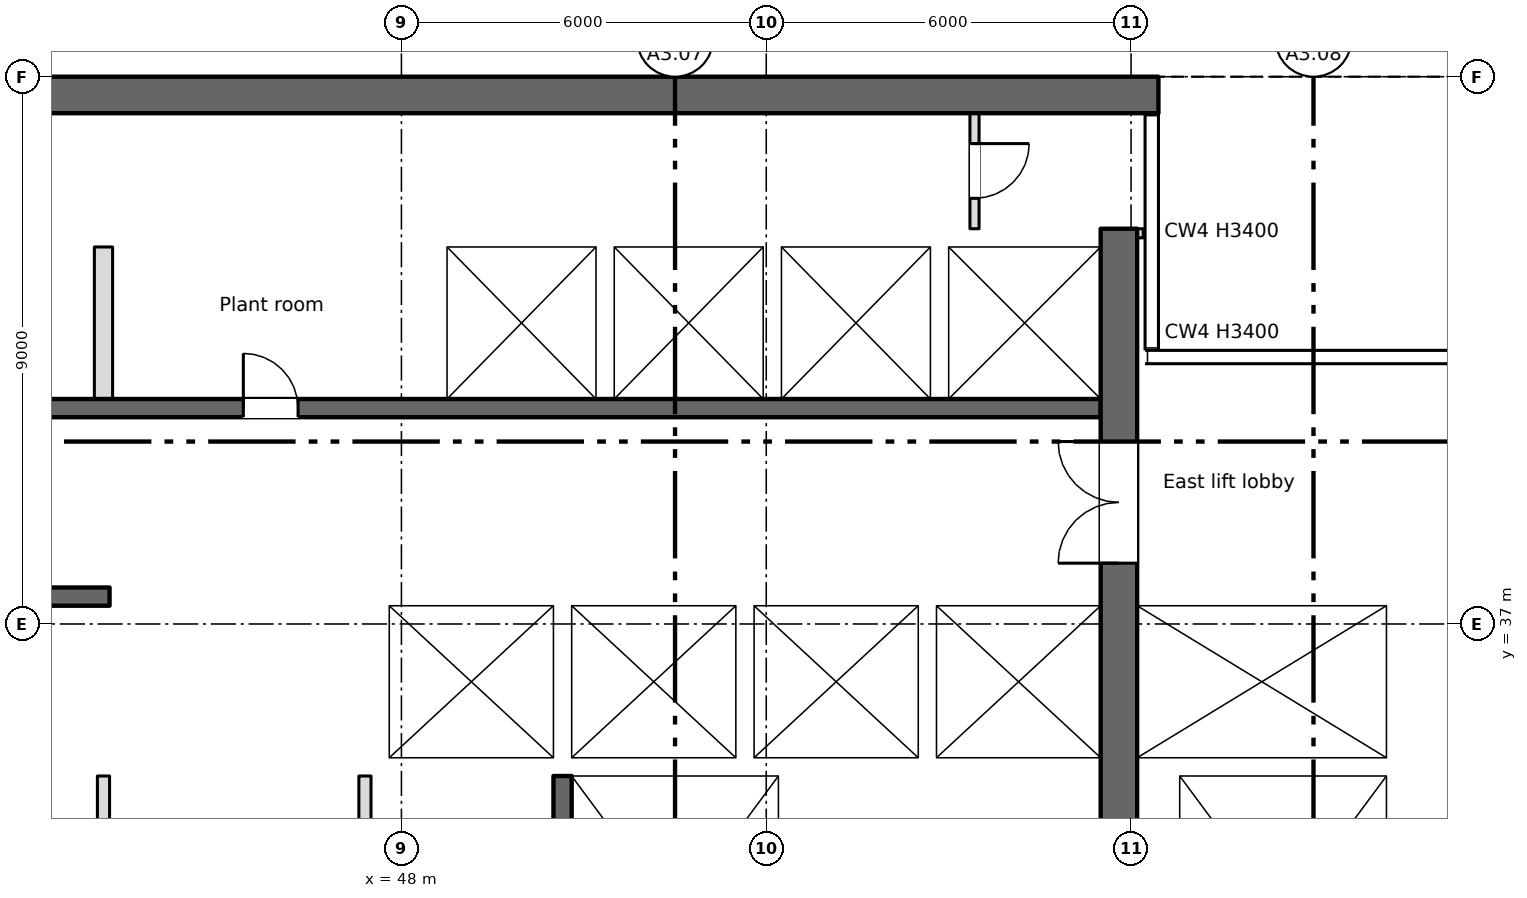
"""IFC4 building model, lengths in metres.
Left out: names, types, materials, properties, quantities, classifications, styles, units other than length and angle.
Written with IfcOpenShell. Run it as: python <this file> out.ifc"""

import sys

from ifc_helpers import new_model, si_unit, direction, frame, frame_2d, origin, place, context, subcontext, project, spatial, rectangle, extrude, element, fill, save


model = new_model("IFC4")
c1 = context("Model", 3, precision=1e-05, world=origin(), true_north=direction((0.0, 1.0)))
c2 = subcontext(c1, "Body", "Model", "MODEL_VIEW")
j1 = project(units=[si_unit("LENGTHUNIT", "METRE"), si_unit("PLANEANGLEUNIT", "RADIAN")], contexts=[c1])
p1 = place(None, origin())
s1 = spatial("IfcSite", under=j1, at=p1, CompositionType="ELEMENT")
p2 = place(p1, origin())
s2 = spatial("IfcBuilding", under=s1, at=p2, CompositionType="ELEMENT")
p3 = place(p2, frame((0.0, 0.0, 254.55)))
s3 = spatial("IfcBuildingStorey", under=s2, at=p3, CompositionType="ELEMENT", Elevation=254.55)
p4 = place(p3, frame((11.55, 45.7, 0.0), z_axis=(0.0, 0.0, 1.0), x_axis=(1.0, 0.0, 0.0)))
e1 = element("IfcWall", 1, at=p4, inside=s3, PredefinedType="SHEAR", context=c2, shape_type="SweptSolid", body=[
    extrude(rectangle(XDim=48.9, YDim=0.6, at=frame_2d((24.45, 0.0))), origin(), (0.0, 0.0, 1.0), 3.4),
])
p5 = place(p3, frame((64.35, 34.8, 0.0), z_axis=(0.0, 0.0, 1.0), x_axis=(0.0, 1.0, 0.0)))
e2 = element("IfcWall", 2, at=p5, inside=s3, PredefinedType="SHEAR", context=c2, shape_type="SweptSolid", body=[
    extrude(rectangle(XDim=6.45, YDim=0.3, at=frame_2d((3.225, 0.0))), origin(), (0.0, 0.0, 1.0), 3.4),
])
p6 = place(p3, frame((59.8, 28.4, 0.0), z_axis=(0.0, 0.0, 1.0), x_axis=(0.0, 1.0, 0.0)))
e3 = element("IfcWall", 3, at=p6, inside=s3, PredefinedType="SHEAR", context=c2, shape_type="SweptSolid", body=[
    extrude(rectangle(XDim=15.1, YDim=0.6, at=frame_2d((7.55, 0.0))), origin(), (0.0, 0.0, 1.0), 3.4),
])
p7 = place(p6, frame((9.6, 0.0, 0.0)))
e4 = element("IfcOpeningElement", 4, at=p7, cuts=e3, PredefinedType="OPENING", context=c2, shape_type="SweptSolid", body=[
    extrude(rectangle(XDim=2.0, YDim=2.1, at=frame_2d((1.0, 1.05))), frame((0.0, 0.31, 0.0), z_axis=(0.0, -1.0, 0.0), x_axis=(1.0, 0.0, 0.0)), (0.0, 0.0, 1.0), 0.62),
])
p8 = place(p3, frame((50.65, 34.5, 0.0), z_axis=(0.0, 0.0, 1.0), x_axis=(0.0, -1.0, 0.0)))
e5 = element("IfcWall", 5, at=p8, inside=s3, PredefinedType="SHEAR", context=c2, shape_type="SweptSolid", body=[
    extrude(rectangle(XDim=6.1, YDim=0.3, at=frame_2d((3.05, 0.0))), origin(), (0.0, 0.0, 1.0), 3.4),
])
p9 = place(p8, frame((4.95, 0.0, 0.0)))
e6 = element("IfcOpeningElement", 6, at=p9, cuts=e5, PredefinedType="OPENING", context=c2, shape_type="SweptSolid", body=[
    extrude(rectangle(XDim=1.1, YDim=2.1, at=frame_2d((0.55, 1.05))), frame((0.0, 0.16, 0.0), z_axis=(0.0, -1.0, 0.0), x_axis=(1.0, 0.0, 0.0)), (0.0, 0.0, 1.0), 0.32),
])
p10 = place(p3, frame((54.35, 28.4, 0.0), z_axis=(0.0, 0.0, 1.0), x_axis=(0.0, 1.0, 0.0)))
e7 = element("IfcWall", 7, at=p10, inside=s3, PredefinedType="SHEAR", context=c2, shape_type="SweptSolid", body=[
    extrude(rectangle(XDim=6.1, YDim=0.3, at=frame_2d((3.05, 0.0))), origin(), (0.0, 0.0, 1.0), 3.4),
])
p11 = place(p3, frame((60.45, 28.4, 0.0), z_axis=(0.0, 0.0, 1.0), x_axis=(0.0, 1.0, 0.0)))
e8 = element("IfcWall", 8, at=p11, inside=s3, PredefinedType="SHEAR", context=c2, shape_type="SweptSolid", body=[
    extrude(rectangle(XDim=6.1, YDim=0.7, at=frame_2d((3.05, 0.0))), origin(), (0.0, 0.0, 1.0), 3.4),
])
p12 = place(p3, frame((64.35, 28.4, 0.0), z_axis=(0.0, 0.0, 1.0), x_axis=(0.0, 1.0, 0.0)))
e9 = element("IfcWall", 9, at=p12, inside=s3, PredefinedType="SHEAR", context=c2, shape_type="SweptSolid", body=[
    extrude(rectangle(XDim=6.1, YDim=0.3, at=frame_2d((3.05, 0.0))), origin(), (0.0, 0.0, 1.0), 3.4),
])
p13 = place(p3, frame((34.8, 34.65, 0.0), z_axis=(0.0, 0.0, 1.0), x_axis=(1.0, 0.0, 0.0)))
e10 = element("IfcWall", 10, at=p13, inside=s3, PredefinedType="SHEAR", context=c2, shape_type="SweptSolid", body=[
    extrude(rectangle(XDim=8.4, YDim=0.3, at=frame_2d((4.2, 0.0))), origin(), (0.0, 0.0, 1.0), 3.4),
])
p14 = place(p3, frame((47.3, 34.65, 0.0), z_axis=(0.0, 0.0, 1.0), x_axis=(1.0, 0.0, 0.0)))
e11 = element("IfcWall", 11, at=p14, inside=s3, PredefinedType="SHEAR", context=c2, shape_type="SweptSolid", body=[
    extrude(rectangle(XDim=12.2, YDim=0.3, at=frame_2d((6.1, 0.0))), origin(), (0.0, 0.0, 1.0), 3.4),
])
p15 = place(p14, frame((1.3, 0.0, 0.0)))
e12 = element("IfcOpeningElement", 12, at=p15, cuts=e11, PredefinedType="OPENING", context=c2, shape_type="SweptSolid", body=[
    extrude(rectangle(XDim=1.1, YDim=2.1, at=frame_2d((0.55, 1.05))), frame((0.0, 0.16, 0.0), z_axis=(0.0, -1.0, 0.0), x_axis=(1.0, 0.0, 0.0)), (0.0, 0.0, 1.0), 0.32),
])
p16 = place(p3, frame((60.1, 34.65, 0.0), z_axis=(0.0, 0.0, 1.0), x_axis=(1.0, 0.0, 0.0)))
e13 = element("IfcWall", 13, at=p16, inside=s3, PredefinedType="SHEAR", context=c2, shape_type="SweptSolid", body=[
    extrude(rectangle(XDim=4.4, YDim=0.3, at=frame_2d((2.2, 0.0))), origin(), (0.0, 0.0, 1.0), 3.4),
])
p17 = place(p3, frame((43.2, 37.45, 0.0), z_axis=(0.0, 0.0, 1.0), x_axis=(-1.0, 0.0, 0.0)))
e14 = element("IfcWall", 14, at=p17, inside=s3, PredefinedType="SHEAR", context=c2, shape_type="SweptSolid", body=[
    extrude(rectangle(XDim=8.4, YDim=0.3, at=frame_2d((4.2, 0.0))), origin(), (0.0, 0.0, 1.0), 3.4),
])
p18 = place(p17, frame((3.75, 0.0, 0.0)))
e15 = element("IfcOpeningElement", 15, at=p18, cuts=e14, PredefinedType="OPENING", context=c2, shape_type="SweptSolid", body=[
    extrude(rectangle(XDim=0.9, YDim=2.1, at=frame_2d((0.45, 1.05))), frame((0.0, 0.16, 0.0), z_axis=(0.0, -1.0, 0.0), x_axis=(1.0, 0.0, 0.0)), (0.0, 0.0, 1.0), 0.32),
])
p19 = place(p3, frame((47.3, 37.45, 0.0), z_axis=(0.0, 0.0, 1.0), x_axis=(1.0, 0.0, 0.0)))
e16 = element("IfcWall", 16, at=p19, inside=s3, PredefinedType="SHEAR", context=c2, shape_type="SweptSolid", body=[
    extrude(rectangle(XDim=12.2, YDim=0.3, at=frame_2d((6.1, 0.0))), origin(), (0.0, 0.0, 1.0), 3.4),
])
p20 = place(p19, frame((4.3, 0.0, 0.0)))
e17 = element("IfcOpeningElement", 17, at=p20, cuts=e16, PredefinedType="OPENING", context=c2, shape_type="SweptSolid", body=[
    extrude(rectangle(XDim=1.1, YDim=2.1, at=frame_2d((0.55, 1.05))), frame((0.0, 0.16, 0.0), z_axis=(0.0, -1.0, 0.0), x_axis=(1.0, 0.0, 0.0)), (0.0, 0.0, 1.0), 0.32),
])
p21 = place(p19, frame((7.3, 0.0, 0.0)))
e18 = element("IfcOpeningElement", 18, at=p21, cuts=e16, PredefinedType="OPENING", context=c2, shape_type="SweptSolid", body=[
    extrude(rectangle(XDim=1.1, YDim=2.1, at=frame_2d((0.55, 1.05))), frame((0.0, 0.16, 0.0), z_axis=(0.0, -1.0, 0.0), x_axis=(1.0, 0.0, 0.0)), (0.0, 0.0, 1.0), 0.32),
])
p22 = place(p19, frame((10.3, 0.0, 0.0)))
e19 = element("IfcOpeningElement", 19, at=p22, cuts=e16, PredefinedType="OPENING", context=c2, shape_type="SweptSolid", body=[
    extrude(rectangle(XDim=1.1, YDim=2.1, at=frame_2d((0.55, 1.05))), frame((0.0, 0.16, 0.0), z_axis=(0.0, -1.0, 0.0), x_axis=(1.0, 0.0, 0.0)), (0.0, 0.0, 1.0), 0.32),
])
p23 = place(p3, frame((60.1, 37.45, 0.0), z_axis=(0.0, 0.0, 1.0), x_axis=(1.0, 0.0, 0.0)))
e20 = element("IfcWall", 20, at=p23, inside=s3, PredefinedType="SHEAR", context=c2, shape_type="SweptSolid", body=[
    extrude(rectangle(XDim=4.1, YDim=0.3, at=frame_2d((2.05, 0.0))), origin(), (0.0, 0.0, 1.0), 3.4),
])
p24 = place(p23, frame((1.5, 0.0, 0.0)))
e21 = element("IfcOpeningElement", 21, at=p24, cuts=e20, PredefinedType="OPENING", context=c2, shape_type="SweptSolid", body=[
    extrude(rectangle(XDim=1.1, YDim=2.1, at=frame_2d((0.55, 1.05))), frame((0.0, 0.16, 0.0), z_axis=(0.0, -1.0, 0.0), x_axis=(1.0, 0.0, 0.0)), (0.0, 0.0, 1.0), 0.32),
])
p25 = place(p3, frame((43.05, 34.8, 0.0), z_axis=(0.0, 0.0, 1.0), x_axis=(0.0, 1.0, 0.0)))
e22 = element("IfcWall", 22, at=p25, inside=s3, PredefinedType="SHEAR", context=c2, shape_type="SweptSolid", body=[
    extrude(rectangle(XDim=2.5, YDim=0.3, at=frame_2d((1.25, 0.0))), origin(), (0.0, 0.0, 1.0), 3.4),
])
p26 = place(p3, frame((47.55, 34.8, 0.0), z_axis=(0.0, 0.0, 1.0), x_axis=(0.0, 1.0, 0.0)))
e23 = element("IfcWall", 23, at=p26, inside=s3, PredefinedType="SHEAR", context=c2, shape_type="SweptSolid", body=[
    extrude(rectangle(XDim=2.5, YDim=0.5, at=frame_2d((1.25, 0.0))), origin(), (0.0, 0.0, 1.0), 3.4),
])
p27 = place(p3, frame((50.65, 34.8, 0.0), z_axis=(0.0, 0.0, 1.0), x_axis=(0.0, 1.0, 0.0)))
e24 = element("IfcWall", 24, at=p27, inside=s3, PredefinedType="SHEAR", context=c2, shape_type="SweptSolid", body=[
    extrude(rectangle(XDim=2.5, YDim=0.3, at=frame_2d((1.25, 0.0))), origin(), (0.0, 0.0, 1.0), 3.4),
])
p28 = place(p3, frame((18.5, 40.55, 0.0), z_axis=(0.0, 0.0, 1.0), x_axis=(1.0, 0.0, 0.0)))
e25 = element("IfcWall", 25, at=p28, inside=s3, PredefinedType="SHEAR", context=c2, shape_type="SweptSolid", body=[
    extrude(rectangle(XDim=41.0, YDim=0.3, at=frame_2d((20.5, 0.0))), origin(), (0.0, 0.0, 1.0), 3.4),
])
p29 = place(p28, frame((2.15, 0.0, 0.0)))
e26 = element("IfcOpeningElement", 26, at=p29, cuts=e25, PredefinedType="OPENING", context=c2, shape_type="SweptSolid", body=[
    extrude(rectangle(XDim=0.9, YDim=2.1, at=frame_2d((0.45, 1.05))), frame((0.0, 0.16, 0.0), z_axis=(0.0, -1.0, 0.0), x_axis=(1.0, 0.0, 0.0)), (0.0, 0.0, 1.0), 0.32),
])
p30 = place(p28, frame((15.9, 0.0, 0.0)))
e27 = element("IfcOpeningElement", 27, at=p30, cuts=e25, PredefinedType="OPENING", context=c2, shape_type="SweptSolid", body=[
    extrude(rectangle(XDim=0.9, YDim=2.1, at=frame_2d((0.45, 1.05))), frame((0.0, 0.16, 0.0), z_axis=(0.0, -1.0, 0.0), x_axis=(1.0, 0.0, 0.0)), (0.0, 0.0, 1.0), 0.32),
])
p31 = place(p28, frame((21.4, 0.0, 0.0)))
e28 = element("IfcOpeningElement", 28, at=p31, cuts=e25, PredefinedType="OPENING", context=c2, shape_type="SweptSolid", body=[
    extrude(rectangle(XDim=0.9, YDim=2.1, at=frame_2d((0.45, 1.05))), frame((0.0, 0.16, 0.0), z_axis=(0.0, -1.0, 0.0), x_axis=(1.0, 0.0, 0.0)), (0.0, 0.0, 1.0), 0.32),
])
p32 = place(p28, frame((26.9, 0.0, 0.0)))
e29 = element("IfcOpeningElement", 29, at=p32, cuts=e25, PredefinedType="OPENING", context=c2, shape_type="SweptSolid", body=[
    extrude(rectangle(XDim=0.9, YDim=2.1, at=frame_2d((0.45, 1.05))), frame((0.0, 0.16, 0.0), z_axis=(0.0, -1.0, 0.0), x_axis=(1.0, 0.0, 0.0)), (0.0, 0.0, 1.0), 0.32),
])
p33 = place(p28, frame((6.175, 0.0, 0.0)))
e30 = element("IfcOpeningElement", 30, at=p33, cuts=e25, PredefinedType="OPENING", context=c2, shape_type="SweptSolid", body=[
    extrude(rectangle(XDim=1.1, YDim=2.1, at=frame_2d((0.55, 1.05))), frame((0.0, 0.16, 0.0), z_axis=(0.0, -1.0, 0.0), x_axis=(1.0, 0.0, 0.0)), (0.0, 0.0, 1.0), 0.32),
])
p34 = place(p28, frame((8.925, 0.0, 0.0)))
e31 = element("IfcOpeningElement", 31, at=p34, cuts=e25, PredefinedType="OPENING", context=c2, shape_type="SweptSolid", body=[
    extrude(rectangle(XDim=1.1, YDim=2.1, at=frame_2d((0.55, 1.05))), frame((0.0, 0.16, 0.0), z_axis=(0.0, -1.0, 0.0), x_axis=(1.0, 0.0, 0.0)), (0.0, 0.0, 1.0), 0.32),
])
p35 = place(p28, frame((11.675, 0.0, 0.0)))
e32 = element("IfcOpeningElement", 32, at=p35, cuts=e25, PredefinedType="OPENING", context=c2, shape_type="SweptSolid", body=[
    extrude(rectangle(XDim=1.1, YDim=2.1, at=frame_2d((0.55, 1.05))), frame((0.0, 0.16, 0.0), z_axis=(0.0, -1.0, 0.0), x_axis=(1.0, 0.0, 0.0)), (0.0, 0.0, 1.0), 0.32),
])
p36 = place(p28, frame((30.925, 0.0, 0.0)))
e33 = element("IfcOpeningElement", 33, at=p36, cuts=e25, PredefinedType="OPENING", context=c2, shape_type="SweptSolid", body=[
    extrude(rectangle(XDim=1.1, YDim=2.1, at=frame_2d((0.55, 1.05))), frame((0.0, 0.16, 0.0), z_axis=(0.0, -1.0, 0.0), x_axis=(1.0, 0.0, 0.0)), (0.0, 0.0, 1.0), 0.32),
])
p37 = place(p28, frame((33.675, 0.0, 0.0)))
e34 = element("IfcOpeningElement", 34, at=p37, cuts=e25, PredefinedType="OPENING", context=c2, shape_type="SweptSolid", body=[
    extrude(rectangle(XDim=1.1, YDim=2.1, at=frame_2d((0.55, 1.05))), frame((0.0, 0.16, 0.0), z_axis=(0.0, -1.0, 0.0), x_axis=(1.0, 0.0, 0.0)), (0.0, 0.0, 1.0), 0.32),
])
p38 = place(p28, frame((36.375, 0.0, 0.0)))
e35 = element("IfcOpeningElement", 35, at=p38, cuts=e25, PredefinedType="OPENING", context=c2, shape_type="SweptSolid", body=[
    extrude(rectangle(XDim=1.2, YDim=2.1, at=frame_2d((0.6, 1.05))), frame((0.0, 0.16, 0.0), z_axis=(0.0, -1.0, 0.0), x_axis=(1.0, 0.0, 0.0)), (0.0, 0.0, 1.0), 0.32),
])
p39 = place(p28, frame((39.15, 0.0, 0.0)))
e36 = element("IfcOpeningElement", 36, at=p39, cuts=e25, PredefinedType="OPENING", context=c2, shape_type="SweptSolid", body=[
    extrude(rectangle(XDim=1.2, YDim=2.1, at=frame_2d((0.6, 1.05))), frame((0.0, 0.16, 0.0), z_axis=(0.0, -1.0, 0.0), x_axis=(1.0, 0.0, 0.0)), (0.0, 0.0, 1.0), 0.32),
])
p40 = place(p3, frame((18.5, 43.35, 0.0), z_axis=(0.0, 0.0, 1.0), x_axis=(1.0, 0.0, 0.0)))
e37 = element("IfcWall", 37, at=p40, inside=s3, PredefinedType="SHEAR", context=c2, shape_type="SweptSolid", body=[
    extrude(rectangle(XDim=41.0, YDim=0.3, at=frame_2d((20.5, 0.0))), origin(), (0.0, 0.0, 1.0), 3.4),
])
for number, where, z_axis, x_axis in (
    (38, (53.65, 34.8, 0.0), (0.0, 0.0, 1.0), (0.0, 1.0, 0.0)),
    (39, (56.65, 34.8, 0.0), (0.0, 0.0, 1.0), (0.0, 1.0, 0.0)),
    (40, (48.6, 40.7, 0.0), (0.0, 0.0, 1.0), (0.0, 1.0, 0.0)),
    (41, (51.35, 40.7, 0.0), (0.0, 0.0, 1.0), (0.0, 1.0, 0.0)),
    (42, (54.1, 40.7, 0.0), (0.0, 0.0, 1.0), (0.0, 1.0, 0.0)),
    (43, (56.85, 40.7, 0.0), (0.0, 0.0, 1.0), (0.0, 1.0, 0.0)),
):
    element("IfcWall", number, at=place(p3, frame(where, z_axis=z_axis, x_axis=x_axis)), inside=s3, PredefinedType="SHEAR", context=c2, shape_type="SweptSolid", body=[
        extrude(rectangle(XDim=2.5, YDim=0.3, at=frame_2d((1.25, 0.0))), origin(), (0.0, 0.0, 1.0), 3.4),
    ])
for number, where, z_axis, x_axis in (
    (44, (43.1, 28.4, 0.0), (0.0, 0.0, 1.0), (0.0, 1.0, 0.0)),
    (45, (47.4, 28.4, 0.0), (0.0, 0.0, 1.0), (0.0, 1.0, 0.0)),
):
    element("IfcWall", number, at=place(p3, frame(where, z_axis=z_axis, x_axis=x_axis)), inside=s3, PredefinedType="PARTITIONING", context=c2, shape_type="SweptSolid", body=[
        extrude(rectangle(XDim=6.1, YDim=0.2, at=frame_2d((3.05, 0.0))), origin(), (0.0, 0.0, 1.0), 3.4),
    ])
p41 = place(p3, frame((57.425, 45.4, 0.0), z_axis=(0.0, 0.0, 1.0), x_axis=(0.0, -1.0, 0.0)))
e46 = element("IfcWall", 46, at=p41, inside=s3, PredefinedType="PARTITIONING", context=c2, shape_type="SweptSolid", body=[
    extrude(rectangle(XDim=1.9, YDim=0.15, at=frame_2d((0.95, 0.0))), origin(), (0.0, 0.0, 1.0), 3.4),
])
p42 = place(p41, frame((0.5, 0.0, 0.0)))
e47 = element("IfcOpeningElement", 47, at=p42, cuts=e46, PredefinedType="OPENING", context=c2, shape_type="SweptSolid", body=[
    extrude(rectangle(XDim=0.9, YDim=2.1, at=frame_2d((0.45, 1.05))), frame((0.0, 0.085, 0.0), z_axis=(0.0, -1.0, 0.0), x_axis=(1.0, 0.0, 0.0)), (0.0, 0.0, 1.0), 0.17),
])
p43 = place(p3, frame((60.15, 43.35, 0.0), z_axis=(0.0, 0.0, 1.0), x_axis=(0.0, 1.0, 0.0)))
e48 = element("IfcWall", 48, at=p43, inside=s3, PredefinedType="PARTITIONING", context=c2, shape_type="SweptSolid", body=[
    extrude(rectangle(XDim=0.15, YDim=0.1, at=frame_2d((0.075, 0.0))), origin(), (0.0, 0.0, 1.0), 3.4),
])
p44 = place(p3, frame((43.1, 40.7, 0.0), z_axis=(0.0, 0.0, 1.0), x_axis=(0.0, 1.0, 0.0)))
e49 = element("IfcWall", 49, at=p44, inside=s3, PredefinedType="PARTITIONING", context=c2, shape_type="SweptSolid", body=[
    extrude(rectangle(XDim=2.5, YDim=0.3, at=frame_2d((1.25, 0.0))), origin(), (0.0, 0.0, 1.0), 3.4),
])
p45 = place(p42, origin())
e50 = element("IfcDoor", 50, at=p45, inside=s3, OperationType="SINGLE_SWING_LEFT", PredefinedType="DOOR", context=c2, shape_type="SweptSolid", body=[
    extrude(rectangle(XDim=0.9, YDim=2.1, at=frame_2d((0.45, 1.05))), frame((0.0, 0.025, 0.0), z_axis=(0.0, -1.0, 0.0), x_axis=(1.0, 0.0, 0.0)), (0.0, 0.0, 1.0), 0.05),
])
fill(e47, e50)
p46 = place(p32, origin())
e51 = element("IfcDoor", 51, at=p46, inside=s3, OperationType="SINGLE_SWING_LEFT", PredefinedType="DOOR", context=c2, shape_type="SweptSolid", body=[
    extrude(rectangle(XDim=0.9, YDim=2.1, at=frame_2d((0.45, 1.05))), frame((0.0, 0.025, 0.0), z_axis=(0.0, -1.0, 0.0), x_axis=(1.0, 0.0, 0.0)), (0.0, 0.0, 1.0), 0.05),
])
fill(e29, e51)
p47 = place(p20, origin())
e52 = element("IfcDoor", 52, at=p47, inside=s3, OperationType="SLIDING_TO_LEFT", PredefinedType="DOOR", context=c2, shape_type="SweptSolid", body=[
    extrude(rectangle(XDim=1.1, YDim=2.1, at=frame_2d((0.55, 1.05))), frame((0.0, 0.025, 0.0), z_axis=(0.0, -1.0, 0.0), x_axis=(1.0, 0.0, 0.0)), (0.0, 0.0, 1.0), 0.05),
])
fill(e17, e52)
p48 = place(p21, origin())
e53 = element("IfcDoor", 53, at=p48, inside=s3, OperationType="SLIDING_TO_LEFT", PredefinedType="DOOR", context=c2, shape_type="SweptSolid", body=[
    extrude(rectangle(XDim=1.1, YDim=2.1, at=frame_2d((0.55, 1.05))), frame((0.0, 0.025, 0.0), z_axis=(0.0, -1.0, 0.0), x_axis=(1.0, 0.0, 0.0)), (0.0, 0.0, 1.0), 0.05),
])
fill(e18, e53)
p49 = place(p22, origin())
e54 = element("IfcDoor", 54, at=p49, inside=s3, OperationType="SLIDING_TO_LEFT", PredefinedType="DOOR", context=c2, shape_type="SweptSolid", body=[
    extrude(rectangle(XDim=1.1, YDim=2.1, at=frame_2d((0.55, 1.05))), frame((0.0, 0.025, 0.0), z_axis=(0.0, -1.0, 0.0), x_axis=(1.0, 0.0, 0.0)), (0.0, 0.0, 1.0), 0.05),
])
fill(e19, e54)
p50 = place(p36, origin())
e55 = element("IfcDoor", 55, at=p50, inside=s3, OperationType="SLIDING_TO_LEFT", PredefinedType="DOOR", context=c2, shape_type="SweptSolid", body=[
    extrude(rectangle(XDim=1.1, YDim=2.1, at=frame_2d((0.55, 1.05))), frame((0.0, 0.025, 0.0), z_axis=(0.0, -1.0, 0.0), x_axis=(1.0, 0.0, 0.0)), (0.0, 0.0, 1.0), 0.05),
])
fill(e33, e55)
p51 = place(p37, origin())
e56 = element("IfcDoor", 56, at=p51, inside=s3, OperationType="SLIDING_TO_LEFT", PredefinedType="DOOR", context=c2, shape_type="SweptSolid", body=[
    extrude(rectangle(XDim=1.1, YDim=2.1, at=frame_2d((0.55, 1.05))), frame((0.0, 0.025, 0.0), z_axis=(0.0, -1.0, 0.0), x_axis=(1.0, 0.0, 0.0)), (0.0, 0.0, 1.0), 0.05),
])
fill(e34, e56)
p52 = place(p38, origin())
e57 = element("IfcDoor", 57, at=p52, inside=s3, OperationType="SLIDING_TO_LEFT", PredefinedType="DOOR", context=c2, shape_type="SweptSolid", body=[
    extrude(rectangle(XDim=1.2, YDim=2.1, at=frame_2d((0.6, 1.05))), frame((0.0, 0.025, 0.0), z_axis=(0.0, -1.0, 0.0), x_axis=(1.0, 0.0, 0.0)), (0.0, 0.0, 1.0), 0.05),
])
fill(e35, e57)
p53 = place(p39, origin())
e58 = element("IfcDoor", 58, at=p53, inside=s3, OperationType="SLIDING_TO_LEFT", PredefinedType="DOOR", context=c2, shape_type="SweptSolid", body=[
    extrude(rectangle(XDim=1.2, YDim=2.1, at=frame_2d((0.6, 1.05))), frame((0.0, 0.025, 0.0), z_axis=(0.0, -1.0, 0.0), x_axis=(1.0, 0.0, 0.0)), (0.0, 0.0, 1.0), 0.05),
])
fill(e36, e58)
p54 = place(p24, origin())
e59 = element("IfcDoor", 59, at=p54, inside=s3, OperationType="SLIDING_TO_LEFT", PredefinedType="DOOR", context=c2, shape_type="SweptSolid", body=[
    extrude(rectangle(XDim=1.1, YDim=2.1, at=frame_2d((0.55, 1.05))), frame((0.0, 0.025, 0.0), z_axis=(0.0, -1.0, 0.0), x_axis=(1.0, 0.0, 0.0)), (0.0, 0.0, 1.0), 0.05),
])
fill(e21, e59)
p55 = place(p15, origin())
e60 = element("IfcDoor", 60, at=p55, inside=s3, OperationType="SLIDING_TO_LEFT", PredefinedType="DOOR", context=c2, shape_type="SweptSolid", body=[
    extrude(rectangle(XDim=1.1, YDim=2.1, at=frame_2d((0.55, 1.05))), frame((0.0, 0.025, 0.0), z_axis=(0.0, -1.0, 0.0), x_axis=(1.0, 0.0, 0.0)), (0.0, 0.0, 1.0), 0.05),
])
fill(e12, e60)
p56 = place(p7, origin())
e61 = element("IfcDoor", 61, at=p56, inside=s3, OperationType="DOUBLE_DOOR_SINGLE_SWING", PredefinedType="DOOR", context=c2, shape_type="SweptSolid", body=[
    extrude(rectangle(XDim=2.0, YDim=2.1, at=frame_2d((1.0, 1.05))), frame((0.0, 0.025, 0.0), z_axis=(0.0, -1.0, 0.0), x_axis=(1.0, 0.0, 0.0)), (0.0, 0.0, 1.0), 0.05),
])
fill(e4, e61)
save(model, sys.argv[1])
